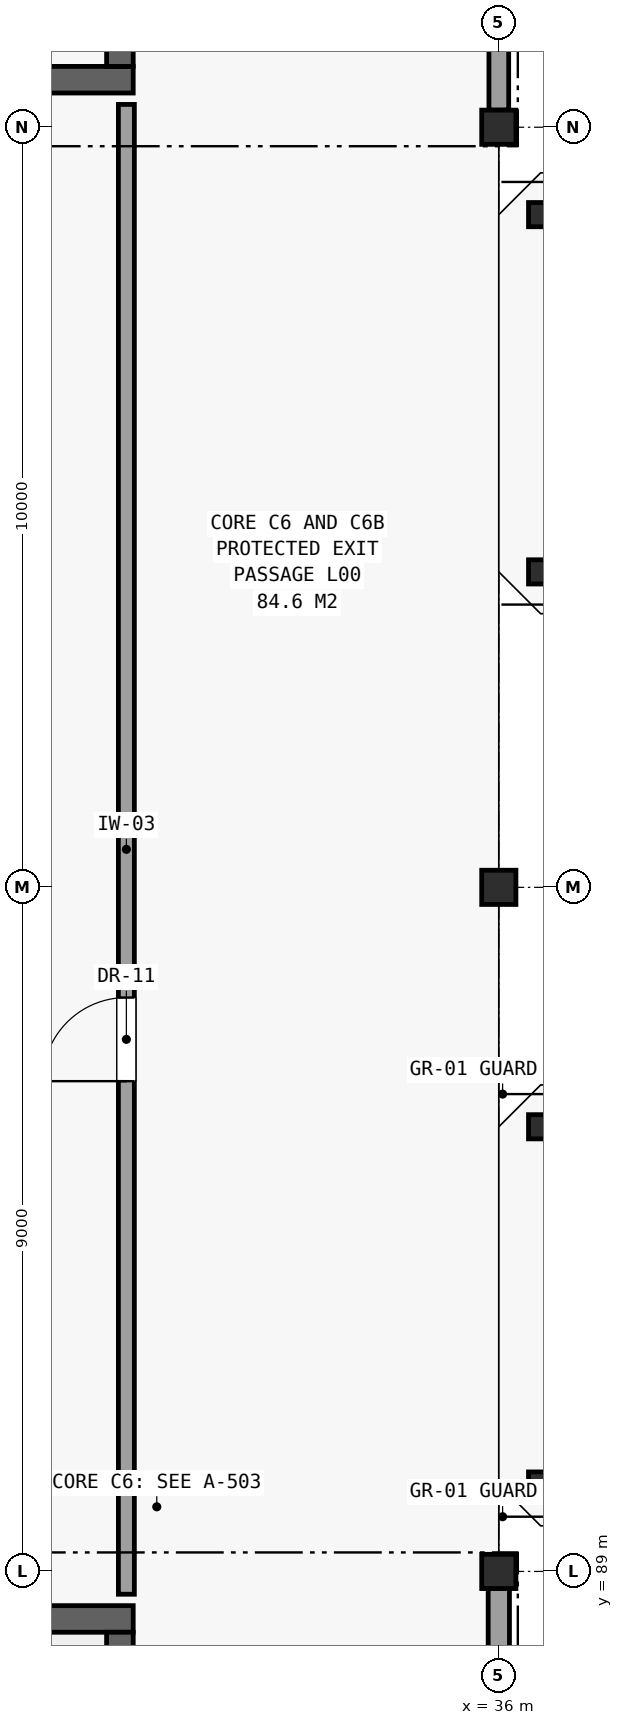
"""IFC4 building model, lengths in metres.
Left out: names, types, materials, properties, quantities, classifications, styles, units other than length and angle.
Written with IfcOpenShell. Run it as: python <this file> out.ifc"""

import sys

from ifc_helpers import new_model, si_unit, direction, frame, frame_2d, origin, origin_2d, place, context, subcontext, project, spatial, rectangle, hollow_rectangle, hollow_circle, extrude, element, fill, save


model = new_model("IFC4")
c1 = context("Model", 3, precision=1e-05, world=origin(), true_north=direction((0.0, 1.0)))
c2 = subcontext(c1, "Body", "Model", "MODEL_VIEW")
j1 = project(units=[si_unit("LENGTHUNIT", "METRE"), si_unit("PLANEANGLEUNIT", "RADIAN")], contexts=[c1])
p1 = place(None, origin())
s1 = spatial("IfcSite", under=j1, at=p1, CompositionType="ELEMENT")
p2 = place(p1, origin())
s2 = spatial("IfcBuilding", under=s1, at=p2, CompositionType="ELEMENT")
p3 = place(p2, origin())
s3 = spatial("IfcBuildingStorey", under=s2, at=p3, CompositionType="ELEMENT", Elevation=0.0)
for number, where, z_axis, x_axis in (
    (1, (36.0, 89.0, 0.0), (0.0, 0.0, 1.0), (1.0, 0.0, 0.0)),
    (2, (36.0, 98.0, 0.0), (0.0, 0.0, 1.0), (1.0, 0.0, 0.0)),
    (3, (36.0, 108.0, 0.0), (0.0, 0.0, 1.0), (1.0, 0.0, 0.0)),
):
    element("IfcColumn", number, at=place(p3, frame(where, z_axis=z_axis, x_axis=x_axis)), inside=s3, PredefinedType="COLUMN", context=c2, shape_type="SweptSolid", body=[
        extrude(hollow_rectangle(XDim=0.45, YDim=0.45, WallThickness=0.022, at=origin_2d()), origin(), (0.0, 0.0, 1.0), 5.1),
    ])
for number, where, z_axis, x_axis in (
    (4, (36.55, 90.15, 0.0), (0.0, 0.0, 1.0), (1.0, 0.0, 0.0)),
    (5, (36.55, 94.85, 0.0), (0.0, 0.0, 1.0), (1.0, 0.0, 0.0)),
    (6, (36.55, 102.15, 0.0), (0.0, 0.0, 1.0), (1.0, 0.0, 0.0)),
    (7, (36.55, 106.85, 0.0), (0.0, 0.0, 1.0), (1.0, 0.0, 0.0)),
):
    element("IfcColumn", number, at=place(p3, frame(where, z_axis=z_axis, x_axis=x_axis)), inside=s3, PredefinedType="COLUMN", context=c2, shape_type="SweptSolid", body=[
        extrude(hollow_circle(Radius=0.159, WallThickness=0.01, at=origin_2d()), origin(), (0.0, 0.0, 1.0), 5.1),
    ])
p4 = place(p3, frame((36.0, 80.225, 0.0), z_axis=(0.0, 0.0, 1.0), x_axis=(0.0, 1.0, 0.0)))
e8 = element("IfcWall", 8, at=p4, inside=s3, PredefinedType="SOLIDWALL", context=c2, shape_type="SweptSolid", body=[
    extrude(rectangle(XDim=8.55, YDim=0.28, at=frame_2d((4.275, 0.0))), origin(), (0.0, 0.0, 1.0), 4.14),
])
p5 = place(p4, frame((2.175, 0.0, 0.95)))
e9 = element("IfcOpeningElement", 9, at=p5, cuts=e8, PredefinedType="OPENING", context=c2, shape_type="SweptSolid", body=[
    extrude(rectangle(XDim=4.2, YDim=1.5, at=frame_2d((2.1, 0.75))), frame((0.0, 0.151, 0.0), z_axis=(0.0, -1.0, 0.0), x_axis=(1.0, 0.0, 0.0)), (0.0, 0.0, 1.0), 0.302),
])
p6 = place(p3, frame((36.0, 108.225, 0.0), z_axis=(0.0, 0.0, 1.0), x_axis=(0.0, 1.0, 0.0)))
e10 = element("IfcWall", 10, at=p6, inside=s3, PredefinedType="SOLIDWALL", context=c2, shape_type="SweptSolid", body=[
    extrude(rectangle(XDim=9.55, YDim=0.26, at=frame_2d((4.775, 0.0))), origin(), (0.0, 0.0, 1.0), 4.14),
])
p7 = place(p6, frame((2.825, 0.0, 0.95)))
e11 = element("IfcOpeningElement", 11, at=p7, cuts=e10, PredefinedType="OPENING", context=c2, shape_type="SweptSolid", body=[
    extrude(rectangle(XDim=3.9, YDim=1.5, at=frame_2d((1.95, 0.75))), frame((0.0, 0.141, 0.0), z_axis=(0.0, -1.0, 0.0), x_axis=(1.0, 0.0, 0.0)), (0.0, 0.0, 1.0), 0.282),
])
p8 = place(p3, frame((27.21, 88.375, 0.0), z_axis=(0.0, 0.0, 1.0), x_axis=(1.0, 0.0, 0.0)))
e12 = element("IfcWall", 12, at=p8, inside=s3, PredefinedType="SHEAR", context=c2, shape_type="SweptSolid", body=[
    extrude(rectangle(XDim=3.98, YDim=0.35, at=frame_2d((1.99, 0.0))), origin(), (0.0, 0.0, 1.0), 4.84),
])
p9 = place(p3, frame((31.015, 80.8, 0.0), z_axis=(0.0, 0.0, 1.0), x_axis=(0.0, 1.0, 0.0)))
e13 = element("IfcWall", 13, at=p9, inside=s3, PredefinedType="SHEAR", context=c2, shape_type="SweptSolid", body=[
    extrude(rectangle(XDim=7.4, YDim=0.35, at=frame_2d((3.7, 0.0))), origin(), (0.0, 0.0, 1.0), 4.84),
])
p10 = place(p9, frame((0.22, 0.0, 0.0)))
e14 = element("IfcOpeningElement", 14, at=p10, cuts=e13, PredefinedType="OPENING", context=c2, shape_type="SweptSolid", body=[
    extrude(rectangle(XDim=1.1, YDim=2.15, at=frame_2d((0.55, 1.075))), frame((0.0, 0.186, 0.0), z_axis=(0.0, -1.0, 0.0), x_axis=(1.0, 0.0, 0.0)), (0.0, 0.0, 1.0), 0.372),
])
p11 = place(p3, frame((27.21, 108.625, 0.0), z_axis=(0.0, 0.0, 1.0), x_axis=(1.0, 0.0, 0.0)))
e15 = element("IfcWall", 15, at=p11, inside=s3, PredefinedType="SHEAR", context=c2, shape_type="SweptSolid", body=[
    extrude(rectangle(XDim=3.98, YDim=0.35, at=frame_2d((1.99, 0.0))), origin(), (0.0, 0.0, 1.0), 4.84),
])
p12 = place(p3, frame((31.015, 108.8, 0.0), z_axis=(0.0, 0.0, 1.0), x_axis=(0.0, 1.0, 0.0)))
e16 = element("IfcWall", 16, at=p12, inside=s3, PredefinedType="SHEAR", context=c2, shape_type="SweptSolid", body=[
    extrude(rectangle(XDim=7.4, YDim=0.35, at=frame_2d((3.7, 0.0))), origin(), (0.0, 0.0, 1.0), 4.84),
])
p13 = place(p12, frame((0.22, 0.0, 0.0)))
e17 = element("IfcOpeningElement", 17, at=p13, cuts=e16, PredefinedType="OPENING", context=c2, shape_type="SweptSolid", body=[
    extrude(rectangle(XDim=1.1, YDim=2.15, at=frame_2d((0.55, 1.075))), frame((0.0, 0.186, 0.0), z_axis=(0.0, -1.0, 0.0), x_axis=(1.0, 0.0, 0.0)), (0.0, 0.0, 1.0), 0.372),
])
p14 = place(p3, frame((31.1, 88.7, 0.0), z_axis=(0.0, 0.0, 1.0), x_axis=(0.0, 1.0, 0.0)))
e18 = element("IfcWall", 18, at=p14, inside=s3, PredefinedType="PARTITIONING", context=c2, shape_type="SweptSolid", body=[
    extrude(rectangle(XDim=19.6, YDim=0.21, at=frame_2d((9.8, 0.0))), origin(), (0.0, 0.0, 1.0), 4.19),
])
p15 = place(p14, frame((6.75, 0.0, 0.0)))
e19 = element("IfcOpeningElement", 19, at=p15, cuts=e18, PredefinedType="OPENING", context=c2, shape_type="SweptSolid", body=[
    extrude(rectangle(XDim=1.1, YDim=2.15, at=frame_2d((0.55, 1.075))), frame((0.0, 0.116, 0.0), z_axis=(0.0, -1.0, 0.0), x_axis=(1.0, 0.0, 0.0)), (0.0, 0.0, 1.0), 0.232),
])
p16 = place(p15, origin())
e20 = element("IfcDoor", 20, at=p16, inside=s3, OperationType="SINGLE_SWING_LEFT", PredefinedType="DOOR", context=c2, shape_type="SweptSolid", body=[
    extrude(rectangle(XDim=1.1, YDim=2.15, at=frame_2d((0.55, 1.075))), frame((0.0, 0.025, 0.0), z_axis=(0.0, -1.0, 0.0), x_axis=(1.0, 0.0, 0.0)), (0.0, 0.0, 1.0), 0.05),
])
fill(e19, e20)
save(model, sys.argv[1])
